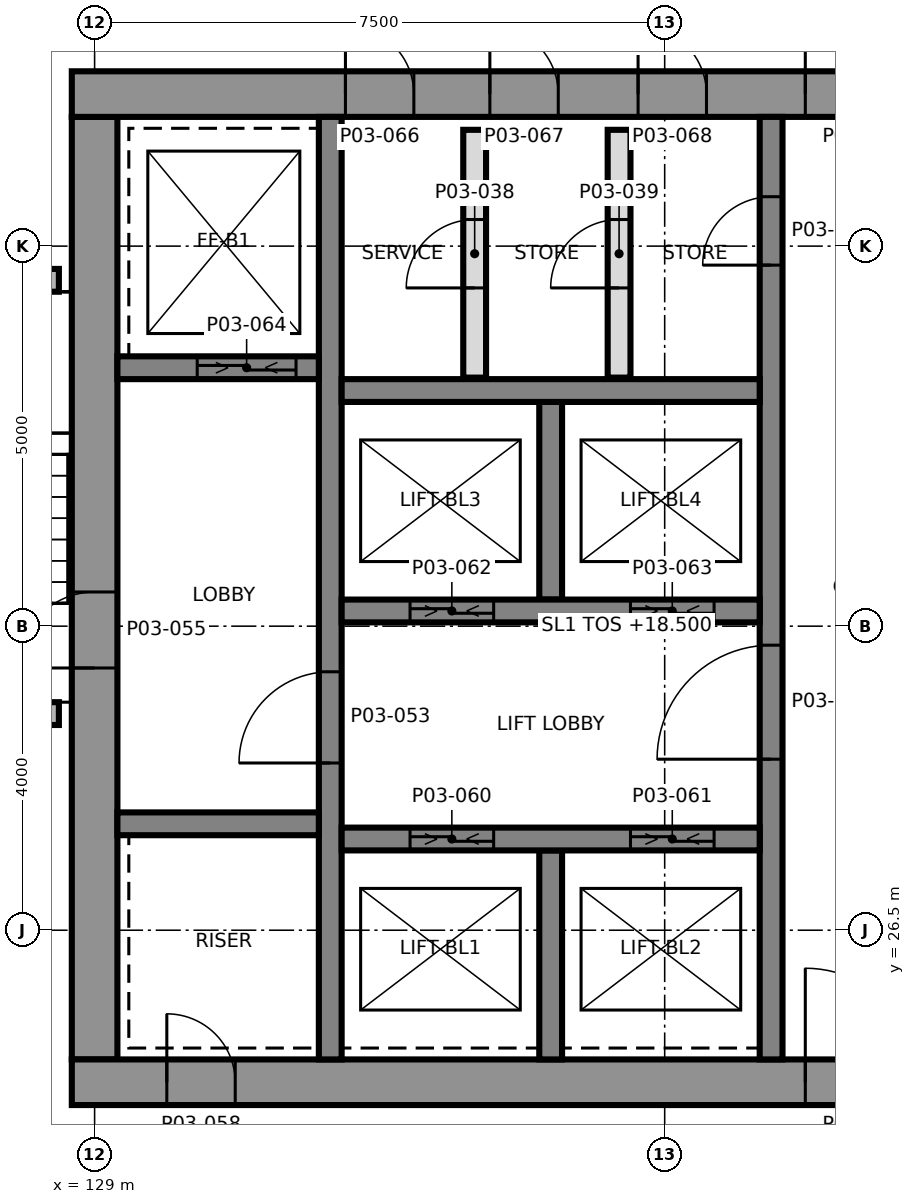
"""IFC4 building model, lengths in metres.
Left out: names, types, materials, properties, quantities, classifications, styles, units other than length and angle.
Written with IfcOpenShell. Run it as: python <this file> out.ifc"""

import sys

from ifc_helpers import new_model, si_unit, direction, frame, frame_2d, origin, place, context, subcontext, project, spatial, rectangle, extrude, element, fill, save


model = new_model("IFC4")
c1 = context("Model", 3, precision=1e-05, world=origin(), true_north=direction((0.0, 1.0)))
c2 = subcontext(c1, "Body", "Model", "MODEL_VIEW")
j1 = project(units=[si_unit("LENGTHUNIT", "METRE"), si_unit("PLANEANGLEUNIT", "RADIAN")], contexts=[c1])
p1 = place(None, origin())
s1 = spatial("IfcSite", under=j1, at=p1, CompositionType="ELEMENT")
p2 = place(p1, origin())
s2 = spatial("IfcBuilding", under=s1, at=p2, CompositionType="ELEMENT")
p3 = place(p2, frame((0.0, 0.0, 18.5)))
s3 = spatial("IfcBuildingStorey", under=s2, at=p3, CompositionType="ELEMENT", Elevation=18.5)
p4 = place(p3, frame((129.0, 24.8, 0.0), z_axis=(0.0, 0.0, 1.0), x_axis=(0.0, 1.0, 0.0)))
e1 = element("IfcWall", 1, at=p4, inside=s3, PredefinedType="SHEAR", context=c2, shape_type="SweptSolid", body=[
    extrude(rectangle(XDim=12.4, YDim=0.6, at=frame_2d((6.2, 0.0))), origin(), (0.0, 0.0, 1.0), 5.0),
])
p5 = place(p4, frame((5.15, 0.0, 0.0)))
e2 = element("IfcOpeningElement", 2, at=p5, cuts=e1, PredefinedType="OPENING", context=c2, shape_type="SweptSolid", body=[
    extrude(rectangle(XDim=1.0, YDim=2.1, at=frame_2d((0.5, 1.05))), frame((0.0, 0.31, 0.0), z_axis=(0.0, -1.0, 0.0), x_axis=(1.0, 0.0, 0.0)), (0.0, 0.0, 1.0), 0.62),
])
p6 = place(p3, frame((128.7, 24.5, 0.0), z_axis=(0.0, 0.0, 1.0), x_axis=(1.0, 0.0, 0.0)))
e3 = element("IfcWall", 3, at=p6, inside=s3, PredefinedType="SHEAR", context=c2, shape_type="SweptSolid", body=[
    extrude(rectangle(XDim=15.0, YDim=0.6, at=frame_2d((7.5, 0.0))), origin(), (0.0, 0.0, 1.0), 5.0),
])
p7 = place(p6, frame((9.65, 0.0, 0.0)))
e4 = element("IfcOpeningElement", 4, at=p7, cuts=e3, PredefinedType="OPENING", context=c2, shape_type="SweptSolid", body=[
    extrude(rectangle(XDim=1.5, YDim=2.1, at=frame_2d((0.75, 1.05))), frame((0.0, 0.31, 0.0), z_axis=(0.0, -1.0, 0.0), x_axis=(1.0, 0.0, 0.0)), (0.0, 0.0, 1.0), 0.62),
])
p8 = place(p6, frame((1.25, 0.0, 0.0)))
e5 = element("IfcOpeningElement", 5, at=p8, cuts=e3, PredefinedType="OPENING", context=c2, shape_type="SweptSolid", body=[
    extrude(rectangle(XDim=0.9, YDim=2.1, at=frame_2d((0.45, 1.05))), frame((0.0, 0.31, 0.0), z_axis=(0.0, -1.0, 0.0), x_axis=(1.0, 0.0, 0.0)), (0.0, 0.0, 1.0), 0.62),
])
p9 = place(p3, frame((128.7, 37.5, 0.0), z_axis=(0.0, 0.0, 1.0), x_axis=(1.0, 0.0, 0.0)))
e6 = element("IfcWall", 6, at=p9, inside=s3, PredefinedType="SHEAR", context=c2, shape_type="SweptSolid", body=[
    extrude(rectangle(XDim=15.0, YDim=0.6, at=frame_2d((7.5, 0.0))), origin(), (0.0, 0.0, 1.0), 5.0),
])
p10 = place(p9, frame((9.65, 0.0, 0.0)))
e7 = element("IfcOpeningElement", 7, at=p10, cuts=e6, PredefinedType="OPENING", context=c2, shape_type="SweptSolid", body=[
    extrude(rectangle(XDim=1.5, YDim=2.1, at=frame_2d((0.75, 1.05))), frame((0.0, 0.31, 0.0), z_axis=(0.0, -1.0, 0.0), x_axis=(1.0, 0.0, 0.0)), (0.0, 0.0, 1.0), 0.62),
])
p11 = place(p9, frame((12.85, 0.0, 0.0)))
e8 = element("IfcOpeningElement", 8, at=p11, cuts=e6, PredefinedType="OPENING", context=c2, shape_type="SweptSolid", body=[
    extrude(rectangle(XDim=0.9, YDim=2.1, at=frame_2d((0.45, 1.05))), frame((0.0, 0.31, 0.0), z_axis=(0.0, -1.0, 0.0), x_axis=(1.0, 0.0, 0.0)), (0.0, 0.0, 1.0), 0.62),
])
p12 = place(p9, frame((3.6, 0.0, 0.0)))
e9 = element("IfcOpeningElement", 9, at=p12, cuts=e6, PredefinedType="OPENING", context=c2, shape_type="SweptSolid", body=[
    extrude(rectangle(XDim=0.9, YDim=2.1, at=frame_2d((0.45, 1.05))), frame((0.0, 0.31, 0.0), z_axis=(0.0, -1.0, 0.0), x_axis=(1.0, 0.0, 0.0)), (0.0, 0.0, 1.0), 0.62),
])
p13 = place(p9, frame((5.5, 0.0, 0.0)))
e10 = element("IfcOpeningElement", 10, at=p13, cuts=e6, PredefinedType="OPENING", context=c2, shape_type="SweptSolid", body=[
    extrude(rectangle(XDim=0.9, YDim=2.1, at=frame_2d((0.45, 1.05))), frame((0.0, 0.31, 0.0), z_axis=(0.0, -1.0, 0.0), x_axis=(1.0, 0.0, 0.0)), (0.0, 0.0, 1.0), 0.62),
])
p14 = place(p9, frame((7.45, 0.0, 0.0)))
e11 = element("IfcOpeningElement", 11, at=p14, cuts=e6, PredefinedType="OPENING", context=c2, shape_type="SweptSolid", body=[
    extrude(rectangle(XDim=0.9, YDim=2.1, at=frame_2d((0.45, 1.05))), frame((0.0, 0.31, 0.0), z_axis=(0.0, -1.0, 0.0), x_axis=(1.0, 0.0, 0.0)), (0.0, 0.0, 1.0), 0.62),
])
p15 = place(p3, frame((132.1, 24.8, 0.0), z_axis=(0.0, 0.0, 1.0), x_axis=(0.0, 1.0, 0.0)))
e12 = element("IfcWall", 12, at=p15, inside=s3, PredefinedType="SHEAR", context=c2, shape_type="SweptSolid", body=[
    extrude(rectangle(XDim=12.4, YDim=0.3, at=frame_2d((6.2, 0.0))), origin(), (0.0, 0.0, 1.0), 5.0),
])
p16 = place(p15, frame((3.9, 0.0, 0.0)))
e13 = element("IfcOpeningElement", 13, at=p16, cuts=e12, PredefinedType="OPENING", context=c2, shape_type="SweptSolid", body=[
    extrude(rectangle(XDim=1.2, YDim=2.1, at=frame_2d((0.6, 1.05))), frame((0.0, 0.16, 0.0), z_axis=(0.0, -1.0, 0.0), x_axis=(1.0, 0.0, 0.0)), (0.0, 0.0, 1.0), 0.32),
])
p17 = place(p3, frame((137.9, 24.8, 0.0), z_axis=(0.0, 0.0, 1.0), x_axis=(0.0, 1.0, 0.0)))
e14 = element("IfcWall", 14, at=p17, inside=s3, PredefinedType="SHEAR", context=c2, shape_type="SweptSolid", body=[
    extrude(rectangle(XDim=12.4, YDim=0.3, at=frame_2d((6.2, 0.0))), origin(), (0.0, 0.0, 1.0), 5.0),
])
p18 = place(p17, frame((3.95, 0.0, 0.0)))
e15 = element("IfcOpeningElement", 15, at=p18, cuts=e14, PredefinedType="OPENING", context=c2, shape_type="SweptSolid", body=[
    extrude(rectangle(XDim=1.5, YDim=2.1, at=frame_2d((0.75, 1.05))), frame((0.0, 0.16, 0.0), z_axis=(0.0, -1.0, 0.0), x_axis=(1.0, 0.0, 0.0)), (0.0, 0.0, 1.0), 0.32),
])
p19 = place(p17, frame((10.45, 0.0, 0.0)))
e16 = element("IfcOpeningElement", 16, at=p19, cuts=e14, PredefinedType="OPENING", context=c2, shape_type="SweptSolid", body=[
    extrude(rectangle(XDim=0.9, YDim=2.1, at=frame_2d((0.45, 1.05))), frame((0.0, 0.16, 0.0), z_axis=(0.0, -1.0, 0.0), x_axis=(1.0, 0.0, 0.0)), (0.0, 0.0, 1.0), 0.32),
])
p20 = place(p3, frame((135.0, 24.8, 0.0), z_axis=(0.0, 0.0, 1.0), x_axis=(0.0, 1.0, 0.0)))
e17 = element("IfcWall", 17, at=p20, inside=s3, PredefinedType="SHEAR", context=c2, shape_type="SweptSolid", body=[
    extrude(rectangle(XDim=2.75, YDim=0.3, at=frame_2d((1.375, 0.0))), origin(), (0.0, 0.0, 1.0), 5.0),
])
p21 = place(p3, frame((135.0, 30.85, 0.0), z_axis=(0.0, 0.0, 1.0), x_axis=(0.0, 1.0, 0.0)))
e18 = element("IfcWall", 18, at=p21, inside=s3, PredefinedType="SHEAR", context=c2, shape_type="SweptSolid", body=[
    extrude(rectangle(XDim=2.6, YDim=0.3, at=frame_2d((1.3, 0.0))), origin(), (0.0, 0.0, 1.0), 5.0),
])
p22 = place(p3, frame((132.25, 27.7, 0.0), z_axis=(0.0, 0.0, 1.0), x_axis=(1.0, 0.0, 0.0)))
e19 = element("IfcWall", 19, at=p22, inside=s3, PredefinedType="SHEAR", context=c2, shape_type="SweptSolid", body=[
    extrude(rectangle(XDim=5.5, YDim=0.3, at=frame_2d((2.75, 0.0))), origin(), (0.0, 0.0, 1.0), 5.0),
])
p23 = place(p22, frame((0.9, 0.0, 0.0)))
e20 = element("IfcOpeningElement", 20, at=p23, cuts=e19, PredefinedType="OPENING", context=c2, shape_type="SweptSolid", body=[
    extrude(rectangle(XDim=1.1, YDim=2.4, at=frame_2d((0.55, 1.2))), frame((0.0, 0.16, 0.0), z_axis=(0.0, -1.0, 0.0), x_axis=(1.0, 0.0, 0.0)), (0.0, 0.0, 1.0), 0.32),
])
p24 = place(p22, frame((3.8, 0.0, 0.0)))
e21 = element("IfcOpeningElement", 21, at=p24, cuts=e19, PredefinedType="OPENING", context=c2, shape_type="SweptSolid", body=[
    extrude(rectangle(XDim=1.1, YDim=2.4, at=frame_2d((0.55, 1.2))), frame((0.0, 0.16, 0.0), z_axis=(0.0, -1.0, 0.0), x_axis=(1.0, 0.0, 0.0)), (0.0, 0.0, 1.0), 0.32),
])
p25 = place(p3, frame((132.25, 30.7, 0.0), z_axis=(0.0, 0.0, 1.0), x_axis=(1.0, 0.0, 0.0)))
e22 = element("IfcWall", 22, at=p25, inside=s3, PredefinedType="SHEAR", context=c2, shape_type="SweptSolid", body=[
    extrude(rectangle(XDim=5.5, YDim=0.3, at=frame_2d((2.75, 0.0))), origin(), (0.0, 0.0, 1.0), 5.0),
])
p26 = place(p25, frame((0.9, 0.0, 0.0)))
e23 = element("IfcOpeningElement", 23, at=p26, cuts=e22, PredefinedType="OPENING", context=c2, shape_type="SweptSolid", body=[
    extrude(rectangle(XDim=1.1, YDim=2.4, at=frame_2d((0.55, 1.2))), frame((0.0, 0.16, 0.0), z_axis=(0.0, -1.0, 0.0), x_axis=(1.0, 0.0, 0.0)), (0.0, 0.0, 1.0), 0.32),
])
p27 = place(p25, frame((3.8, 0.0, 0.0)))
e24 = element("IfcOpeningElement", 24, at=p27, cuts=e22, PredefinedType="OPENING", context=c2, shape_type="SweptSolid", body=[
    extrude(rectangle(XDim=1.1, YDim=2.4, at=frame_2d((0.55, 1.2))), frame((0.0, 0.16, 0.0), z_axis=(0.0, -1.0, 0.0), x_axis=(1.0, 0.0, 0.0)), (0.0, 0.0, 1.0), 0.32),
])
p28 = place(p3, frame((132.25, 33.6, 0.0), z_axis=(0.0, 0.0, 1.0), x_axis=(1.0, 0.0, 0.0)))
e25 = element("IfcWall", 25, at=p28, inside=s3, PredefinedType="SHEAR", context=c2, shape_type="SweptSolid", body=[
    extrude(rectangle(XDim=5.5, YDim=0.3, at=frame_2d((2.75, 0.0))), origin(), (0.0, 0.0, 1.0), 5.0),
])
p29 = place(p3, frame((129.3, 27.9, 0.0), z_axis=(0.0, 0.0, 1.0), x_axis=(1.0, 0.0, 0.0)))
e26 = element("IfcWall", 26, at=p29, inside=s3, PredefinedType="SHEAR", context=c2, shape_type="SweptSolid", body=[
    extrude(rectangle(XDim=2.65, YDim=0.3, at=frame_2d((1.325, 0.0))), origin(), (0.0, 0.0, 1.0), 5.0),
])
p30 = place(p3, frame((129.3, 33.9, 0.0), z_axis=(0.0, 0.0, 1.0), x_axis=(1.0, 0.0, 0.0)))
e27 = element("IfcWall", 27, at=p30, inside=s3, PredefinedType="SHEAR", context=c2, shape_type="SweptSolid", body=[
    extrude(rectangle(XDim=2.65, YDim=0.3, at=frame_2d((1.325, 0.0))), origin(), (0.0, 0.0, 1.0), 5.0),
])
p31 = place(p30, frame((1.05, 0.0, 0.0)))
e28 = element("IfcOpeningElement", 28, at=p31, cuts=e27, PredefinedType="OPENING", context=c2, shape_type="SweptSolid", body=[
    extrude(rectangle(XDim=1.3, YDim=2.4, at=frame_2d((0.65, 1.2))), frame((0.0, 0.16, 0.0), z_axis=(0.0, -1.0, 0.0), x_axis=(1.0, 0.0, 0.0)), (0.0, 0.0, 1.0), 0.32),
])
p32 = place(p3, frame((125.7, 29.35, 0.0), z_axis=(0.0, 0.0, 1.0), x_axis=(1.0, 0.0, 0.0)))
e29 = element("IfcWall", 29, at=p32, inside=s3, PredefinedType="SHEAR", context=c2, shape_type="SweptSolid", body=[
    extrude(rectangle(XDim=2.83, YDim=0.3, at=frame_2d((1.415, 0.0))), origin(), (0.0, 0.0, 1.0), 4.7),
])
p33 = place(p32, frame((0.975, 0.0, 0.0)))
e30 = element("IfcOpeningElement", 30, at=p33, cuts=e29, PredefinedType="OPENING", context=c2, shape_type="SweptSolid", body=[
    extrude(rectangle(XDim=1.2, YDim=2.1, at=frame_2d((0.6, 1.05))), frame((0.0, 0.16, 0.0), z_axis=(0.0, -1.0, 0.0), x_axis=(1.0, 0.0, 0.0)), (0.0, 0.0, 1.0), 0.32),
])
p34 = place(p3, frame((114.6, 35.05, 0.0), z_axis=(0.0, 0.0, 1.0), x_axis=(1.0, 0.0, 0.0)))
e31 = element("IfcWall", 31, at=p34, inside=s3, PredefinedType="SHEAR", context=c2, shape_type="SweptSolid", body=[
    extrude(rectangle(XDim=13.93, YDim=0.3, at=frame_2d((6.965, 0.0))), origin(), (0.0, 0.0, 1.0), 4.7),
])
p35 = place(p34, frame((5.13, 0.0, 0.0)))
e32 = element("IfcOpeningElement", 32, at=p35, cuts=e31, PredefinedType="OPENING", context=c2, shape_type="SweptSolid", body=[
    extrude(rectangle(XDim=1.0, YDim=2.1, at=frame_2d((0.5, 1.05))), frame((0.0, 0.16, 0.0), z_axis=(0.0, -1.0, 0.0), x_axis=(1.0, 0.0, 0.0)), (0.0, 0.0, 1.0), 0.32),
])
p36 = place(p3, frame((134.0, 33.77, 0.0), z_axis=(0.0, 0.0, 1.0), x_axis=(0.0, 1.0, 0.0)))
e33 = element("IfcWall", 33, at=p36, inside=s3, PredefinedType="PARTITIONING", context=c2, shape_type="SweptSolid", body=[
    extrude(rectangle(XDim=3.26, YDim=0.3, at=frame_2d((1.63, 0.0))), origin(), (0.0, 0.0, 1.0), 4.7),
])
p37 = place(p36, frame((1.18, 0.0, 0.0)))
e34 = element("IfcOpeningElement", 34, at=p37, cuts=e33, PredefinedType="OPENING", context=c2, shape_type="SweptSolid", body=[
    extrude(rectangle(XDim=0.9, YDim=2.1, at=frame_2d((0.45, 1.05))), frame((0.0, 0.16, 0.0), z_axis=(0.0, -1.0, 0.0), x_axis=(1.0, 0.0, 0.0)), (0.0, 0.0, 1.0), 0.32),
])
p38 = place(p3, frame((135.9, 33.77, 0.0), z_axis=(0.0, 0.0, 1.0), x_axis=(0.0, 1.0, 0.0)))
e35 = element("IfcWall", 35, at=p38, inside=s3, PredefinedType="PARTITIONING", context=c2, shape_type="SweptSolid", body=[
    extrude(rectangle(XDim=3.26, YDim=0.3, at=frame_2d((1.63, 0.0))), origin(), (0.0, 0.0, 1.0), 4.7),
])
p39 = place(p38, frame((1.18, 0.0, 0.0)))
e36 = element("IfcOpeningElement", 36, at=p39, cuts=e35, PredefinedType="OPENING", context=c2, shape_type="SweptSolid", body=[
    extrude(rectangle(XDim=0.9, YDim=2.1, at=frame_2d((0.45, 1.05))), frame((0.0, 0.16, 0.0), z_axis=(0.0, -1.0, 0.0), x_axis=(1.0, 0.0, 0.0)), (0.0, 0.0, 1.0), 0.32),
])
p40 = place(p37, origin())
e37 = element("IfcDoor", 37, at=p40, inside=s3, OperationType="SINGLE_SWING_RIGHT", PredefinedType="DOOR", context=c2, shape_type="SweptSolid", body=[
    extrude(rectangle(XDim=0.9, YDim=2.1, at=frame_2d((0.45, 1.05))), frame((0.0, 0.025, 0.0), z_axis=(0.0, -1.0, 0.0), x_axis=(1.0, 0.0, 0.0)), (0.0, 0.0, 1.0), 0.05),
])
fill(e34, e37)
p41 = place(p39, origin())
e38 = element("IfcDoor", 38, at=p41, inside=s3, OperationType="SINGLE_SWING_LEFT", PredefinedType="DOOR", context=c2, shape_type="SweptSolid", body=[
    extrude(rectangle(XDim=0.9, YDim=2.1, at=frame_2d((0.45, 1.05))), frame((0.0, 0.025, 0.0), z_axis=(0.0, -1.0, 0.0), x_axis=(1.0, 0.0, 0.0)), (0.0, 0.0, 1.0), 0.05),
])
fill(e36, e38)
p42 = place(p18, origin())
e39 = element("IfcDoor", 39, at=p42, inside=s3, OperationType="SINGLE_SWING_RIGHT", PredefinedType="DOOR", context=c2, shape_type="SweptSolid", body=[
    extrude(rectangle(XDim=1.5, YDim=2.1, at=frame_2d((0.75, 1.05))), frame((0.0, 0.025, 0.0), z_axis=(0.0, -1.0, 0.0), x_axis=(1.0, 0.0, 0.0)), (0.0, 0.0, 1.0), 0.05),
])
fill(e15, e39)
p43 = place(p16, origin())
e40 = element("IfcDoor", 40, at=p43, inside=s3, OperationType="SINGLE_SWING_LEFT", PredefinedType="DOOR", context=c2, shape_type="SweptSolid", body=[
    extrude(rectangle(XDim=1.2, YDim=2.1, at=frame_2d((0.6, 1.05))), frame((0.0, 0.025, 0.0), z_axis=(0.0, -1.0, 0.0), x_axis=(1.0, 0.0, 0.0)), (0.0, 0.0, 1.0), 0.05),
])
fill(e13, e40)
p44 = place(p5, origin())
e41 = element("IfcDoor", 41, at=p44, inside=s3, OperationType="SINGLE_SWING_RIGHT", PredefinedType="DOOR", context=c2, shape_type="SweptSolid", body=[
    extrude(rectangle(XDim=1.0, YDim=2.1, at=frame_2d((0.5, 1.05))), frame((0.0, 0.025, 0.0), z_axis=(0.0, -1.0, 0.0), x_axis=(1.0, 0.0, 0.0)), (0.0, 0.0, 1.0), 0.05),
])
fill(e2, e41)
p45 = place(p7, origin())
e42 = element("IfcDoor", 42, at=p45, inside=s3, OperationType="SINGLE_SWING_LEFT", PredefinedType="DOOR", context=c2, shape_type="SweptSolid", body=[
    extrude(rectangle(XDim=1.5, YDim=2.1, at=frame_2d((0.75, 1.05))), frame((0.0, 0.025, 0.0), z_axis=(0.0, -1.0, 0.0), x_axis=(1.0, 0.0, 0.0)), (0.0, 0.0, 1.0), 0.05),
])
fill(e4, e42)
p46 = place(p10, origin())
e43 = element("IfcDoor", 43, at=p46, inside=s3, OperationType="SINGLE_SWING_RIGHT", PredefinedType="DOOR", context=c2, shape_type="SweptSolid", body=[
    extrude(rectangle(XDim=1.5, YDim=2.1, at=frame_2d((0.75, 1.05))), frame((0.0, 0.025, 0.0), z_axis=(0.0, -1.0, 0.0), x_axis=(1.0, 0.0, 0.0)), (0.0, 0.0, 1.0), 0.05),
])
fill(e7, e43)
p47 = place(p8, origin())
e44 = element("IfcDoor", 44, at=p47, inside=s3, OperationType="SINGLE_SWING_LEFT", PredefinedType="DOOR", context=c2, shape_type="SweptSolid", body=[
    extrude(rectangle(XDim=0.9, YDim=2.1, at=frame_2d((0.45, 1.05))), frame((0.0, 0.025, 0.0), z_axis=(0.0, -1.0, 0.0), x_axis=(1.0, 0.0, 0.0)), (0.0, 0.0, 1.0), 0.05),
])
fill(e5, e44)
p48 = place(p23, origin())
e45 = element("IfcDoor", 45, at=p48, inside=s3, OperationType="SLIDING_TO_LEFT", PredefinedType="DOOR", context=c2, shape_type="SweptSolid", body=[
    extrude(rectangle(XDim=1.1, YDim=2.4, at=frame_2d((0.55, 1.2))), frame((0.0, 0.025, 0.0), z_axis=(0.0, -1.0, 0.0), x_axis=(1.0, 0.0, 0.0)), (0.0, 0.0, 1.0), 0.05),
])
fill(e20, e45)
p49 = place(p24, origin())
e46 = element("IfcDoor", 46, at=p49, inside=s3, OperationType="SLIDING_TO_LEFT", PredefinedType="DOOR", context=c2, shape_type="SweptSolid", body=[
    extrude(rectangle(XDim=1.1, YDim=2.4, at=frame_2d((0.55, 1.2))), frame((0.0, 0.025, 0.0), z_axis=(0.0, -1.0, 0.0), x_axis=(1.0, 0.0, 0.0)), (0.0, 0.0, 1.0), 0.05),
])
fill(e21, e46)
p50 = place(p26, origin())
e47 = element("IfcDoor", 47, at=p50, inside=s3, OperationType="SLIDING_TO_LEFT", PredefinedType="DOOR", context=c2, shape_type="SweptSolid", body=[
    extrude(rectangle(XDim=1.1, YDim=2.4, at=frame_2d((0.55, 1.2))), frame((0.0, 0.025, 0.0), z_axis=(0.0, -1.0, 0.0), x_axis=(1.0, 0.0, 0.0)), (0.0, 0.0, 1.0), 0.05),
])
fill(e23, e47)
p51 = place(p27, origin())
e48 = element("IfcDoor", 48, at=p51, inside=s3, OperationType="SLIDING_TO_LEFT", PredefinedType="DOOR", context=c2, shape_type="SweptSolid", body=[
    extrude(rectangle(XDim=1.1, YDim=2.4, at=frame_2d((0.55, 1.2))), frame((0.0, 0.025, 0.0), z_axis=(0.0, -1.0, 0.0), x_axis=(1.0, 0.0, 0.0)), (0.0, 0.0, 1.0), 0.05),
])
fill(e24, e48)
p52 = place(p31, origin())
e49 = element("IfcDoor", 49, at=p52, inside=s3, OperationType="SLIDING_TO_LEFT", PredefinedType="DOOR", context=c2, shape_type="SweptSolid", body=[
    extrude(rectangle(XDim=1.3, YDim=2.4, at=frame_2d((0.65, 1.2))), frame((0.0, 0.025, 0.0), z_axis=(0.0, -1.0, 0.0), x_axis=(1.0, 0.0, 0.0)), (0.0, 0.0, 1.0), 0.05),
])
fill(e28, e49)
p53 = place(p12, origin())
e50 = element("IfcDoor", 50, at=p53, inside=s3, OperationType="SINGLE_SWING_LEFT", PredefinedType="DOOR", context=c2, shape_type="SweptSolid", body=[
    extrude(rectangle(XDim=0.9, YDim=2.1, at=frame_2d((0.45, 1.05))), frame((0.0, 0.025, 0.0), z_axis=(0.0, -1.0, 0.0), x_axis=(1.0, 0.0, 0.0)), (0.0, 0.0, 1.0), 0.05),
])
fill(e9, e50)
p54 = place(p13, origin())
e51 = element("IfcDoor", 51, at=p54, inside=s3, OperationType="SINGLE_SWING_RIGHT", PredefinedType="DOOR", context=c2, shape_type="SweptSolid", body=[
    extrude(rectangle(XDim=0.9, YDim=2.1, at=frame_2d((0.45, 1.05))), frame((0.0, 0.025, 0.0), z_axis=(0.0, -1.0, 0.0), x_axis=(1.0, 0.0, 0.0)), (0.0, 0.0, 1.0), 0.05),
])
fill(e10, e51)
p55 = place(p14, origin())
e52 = element("IfcDoor", 52, at=p55, inside=s3, OperationType="SINGLE_SWING_LEFT", PredefinedType="DOOR", context=c2, shape_type="SweptSolid", body=[
    extrude(rectangle(XDim=0.9, YDim=2.1, at=frame_2d((0.45, 1.05))), frame((0.0, 0.025, 0.0), z_axis=(0.0, -1.0, 0.0), x_axis=(1.0, 0.0, 0.0)), (0.0, 0.0, 1.0), 0.05),
])
fill(e11, e52)
p56 = place(p19, origin())
e53 = element("IfcDoor", 53, at=p56, inside=s3, OperationType="SINGLE_SWING_RIGHT", PredefinedType="DOOR", context=c2, shape_type="SweptSolid", body=[
    extrude(rectangle(XDim=0.9, YDim=2.1, at=frame_2d((0.45, 1.05))), frame((0.0, 0.025, 0.0), z_axis=(0.0, -1.0, 0.0), x_axis=(1.0, 0.0, 0.0)), (0.0, 0.0, 1.0), 0.05),
])
fill(e16, e53)
save(model, sys.argv[1])
